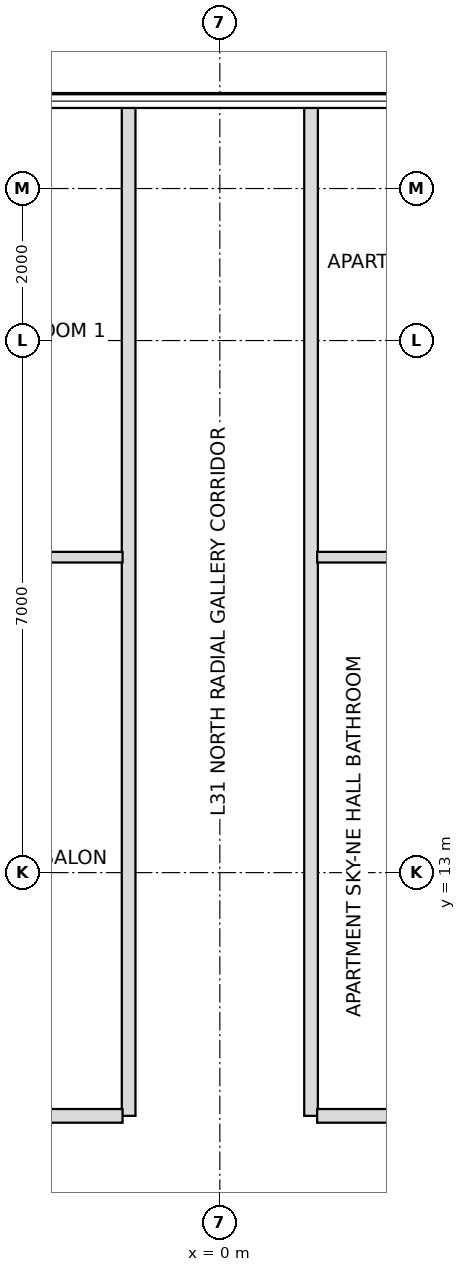
"""IFC4 building model, lengths in metres.
Left out: names, types, materials, properties, quantities, classifications, styles, units other than length and angle.
Written with IfcOpenShell. Run it as: python <this file> out.ifc"""

import sys

from ifc_helpers import new_model, si_unit, direction, frame, frame_2d, origin, place, context, subcontext, project, spatial, rectangle, extrude, element, save


model = new_model("IFC4")
c1 = context("Model", 3, precision=1e-05, world=origin(), true_north=direction((0.0, 1.0)))
c2 = subcontext(c1, "Body", "Model", "MODEL_VIEW")
j1 = project(units=[si_unit("LENGTHUNIT", "METRE"), si_unit("PLANEANGLEUNIT", "RADIAN")], contexts=[c1])
p1 = place(None, origin())
s1 = spatial("IfcSite", under=j1, at=p1, CompositionType="ELEMENT")
p2 = place(p1, origin())
s2 = spatial("IfcBuilding", under=s1, at=p2, CompositionType="ELEMENT")
p3 = place(p2, frame((0.0, 0.0, 125.1)))
s3 = spatial("IfcBuildingStorey", under=s2, at=p3, CompositionType="ELEMENT", Elevation=125.1)
for number, where, z_axis, x_axis in (
    (1, (-1.2, 9.8, 0.0), (0.0, 0.0, 1.0), (0.0, 1.0, 0.0)),
    (2, (1.2, 9.8, 0.0), (0.0, 0.0, 1.0), (0.0, 1.0, 0.0)),
):
    element("IfcWall", number, at=place(p3, frame(where, z_axis=z_axis, x_axis=x_axis)), inside=s3, PredefinedType="PARTITIONING", context=c2, shape_type="SweptSolid", body=[
        extrude(rectangle(XDim=13.35, YDim=0.18, at=frame_2d((6.675, 0.0))), origin(), (0.0, 0.0, 1.0), 3.716),
    ])
p4 = place(p3, frame((-6.22, 9.8, 0.0), z_axis=(0.0, 0.0, 1.0), x_axis=(1.0, 0.0, 0.0)))
e3 = element("IfcWall", 3, at=p4, inside=s3, PredefinedType="PARTITIONING", context=c2, shape_type="SweptSolid", body=[
    extrude(rectangle(XDim=4.94, YDim=0.18, at=frame_2d((2.47, 0.0))), origin(), (0.0, 0.0, 1.0), 4.28),
])
p5 = place(p3, frame((1.28, 9.8, 0.0), z_axis=(0.0, 0.0, 1.0), x_axis=(1.0, 0.0, 0.0)))
e4 = element("IfcWall", 4, at=p5, inside=s3, PredefinedType="PARTITIONING", context=c2, shape_type="SweptSolid", body=[
    extrude(rectangle(XDim=1.79, YDim=0.18, at=frame_2d((0.895, 0.0))), origin(), (0.0, 0.0, 1.0), 4.28),
])
p6 = place(p3, frame((-6.22, 17.15, 0.0), z_axis=(0.0, 0.0, 1.0), x_axis=(1.0, 0.0, 0.0)))
e5 = element("IfcWall", 5, at=p6, inside=s3, PredefinedType="PARTITIONING", context=c2, shape_type="SweptSolid", body=[
    extrude(rectangle(XDim=4.94, YDim=0.14, at=frame_2d((2.47, 0.0))), origin(), (0.0, 0.0, 1.0), 4.28),
])
p7 = place(p6, frame((1.995, 0.0, 0.0)))
e6 = element("IfcOpeningElement", 6, at=p7, cuts=e5, PredefinedType="OPENING", context=c2, shape_type="SweptSolid", body=[
    extrude(rectangle(XDim=0.95, YDim=2.1, at=frame_2d((0.475, 1.05))), frame((0.0, 0.08, 0.0), z_axis=(0.0, -1.0, 0.0), x_axis=(1.0, 0.0, 0.0)), (0.0, 0.0, 1.0), 0.16),
])
p8 = place(p3, frame((1.28, 17.15, 0.0), z_axis=(0.0, 0.0, 1.0), x_axis=(1.0, 0.0, 0.0)))
e7 = element("IfcWall", 7, at=p8, inside=s3, PredefinedType="PARTITIONING", context=c2, shape_type="SweptSolid", body=[
    extrude(rectangle(XDim=1.79, YDim=0.14, at=frame_2d((0.895, 0.0))), origin(), (0.0, 0.0, 1.0), 4.28),
])
save(model, sys.argv[1])
